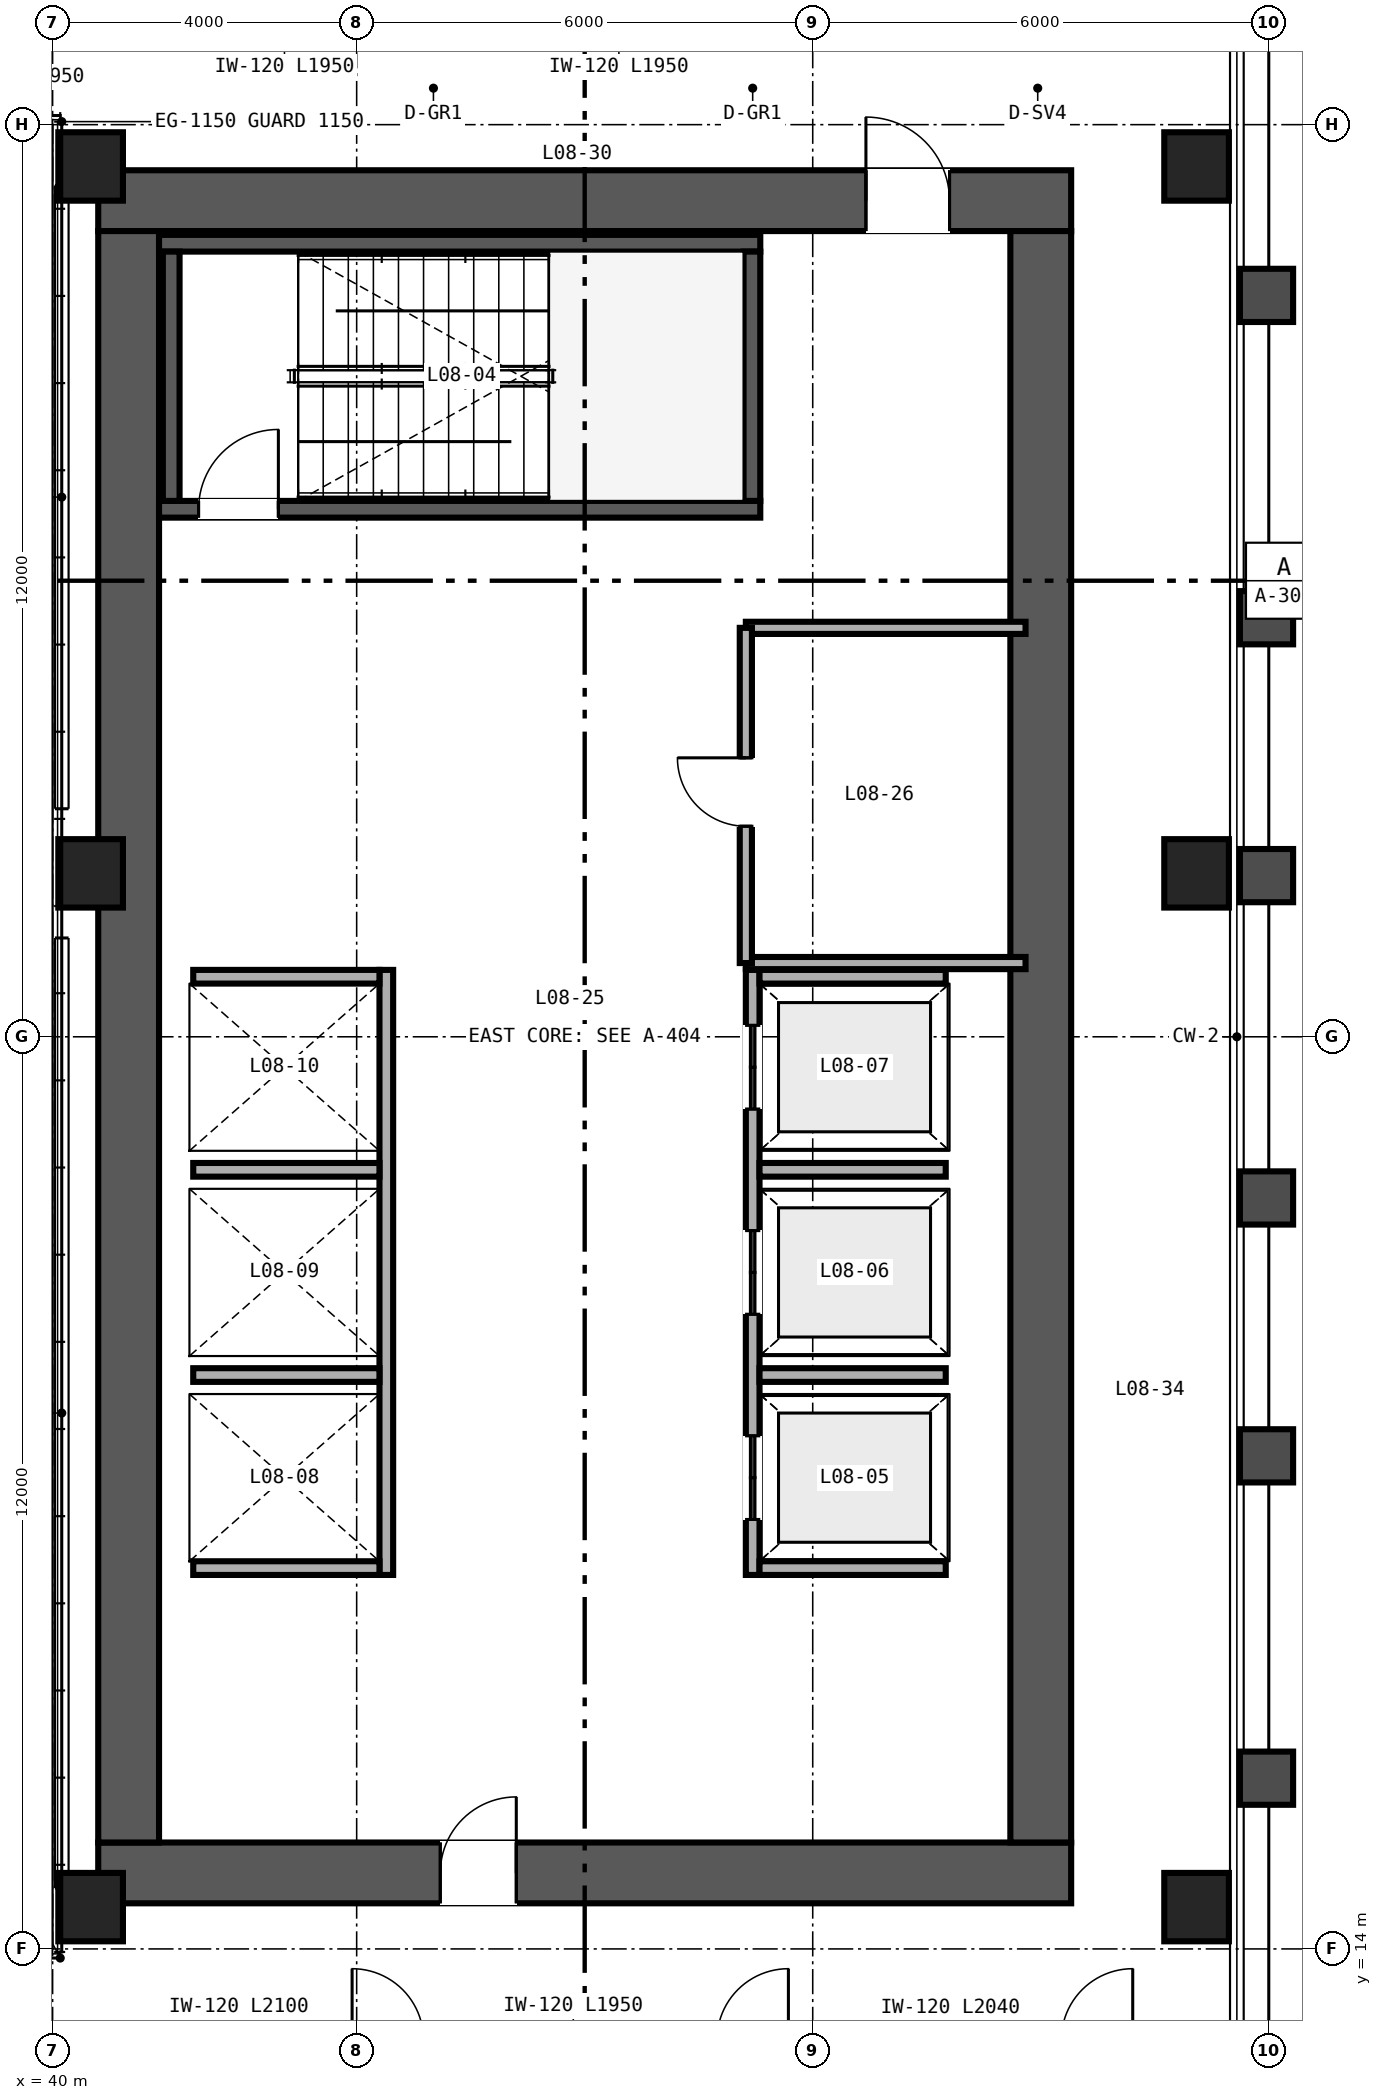
"""IFC4 building model, lengths in metres.
Left out: names, types, materials, properties, quantities, classifications, styles, units other than length and angle.
Written with IfcOpenShell. Run it as: python <this file> out.ifc"""

import sys

from ifc_helpers import new_model, si_unit, direction, frame, frame_2d, origin, origin_2d, place, context, subcontext, project, spatial, rectangle, hollow_rectangle, extrude, source, transform, mapped, element, fill, save


model = new_model("IFC4")
c1 = context("Model", 3, precision=1e-05, world=origin(), true_north=direction((0.0, 1.0)))
c2 = subcontext(c1, "Body", "Model", "MODEL_VIEW")
j1 = project(units=[si_unit("LENGTHUNIT", "METRE"), si_unit("PLANEANGLEUNIT", "RADIAN")], contexts=[c1])
p1 = place(None, origin())
s1 = spatial("IfcSite", under=j1, at=p1, CompositionType="ELEMENT")
p2 = place(p1, origin())
s2 = spatial("IfcBuilding", under=s1, at=p2, CompositionType="ELEMENT")
p3 = place(p2, frame((0.0, 0.0, 38.4)))
s3 = spatial("IfcBuildingStorey", under=s2, at=p3, CompositionType="ELEMENT", Elevation=38.4)
p4 = place(p3, frame((40.6, 15.0, 0.0), z_axis=(0.0, 0.0, 1.0), x_axis=(1.0, 0.0, 0.0)))
e1 = element("IfcWall", 1, at=p4, inside=s3, PredefinedType="SHEAR", context=c2, shape_type="SweptSolid", body=[
    extrude(rectangle(XDim=12.8, YDim=0.8, at=frame_2d((6.4, 0.0))), origin(), (0.0, 0.0, 1.0), 3.35),
])
p5 = place(p4, frame((4.5, 0.0, 0.0)))
e2 = element("IfcOpeningElement", 2, at=p5, cuts=e1, PredefinedType="OPENING", context=c2, shape_type="SweptSolid", body=[
    extrude(rectangle(XDim=1.0, YDim=2.15, at=frame_2d((0.5, 1.075))), frame((0.0, 0.41, 0.0), z_axis=(0.0, -1.0, 0.0), x_axis=(1.0, 0.0, 0.0)), (0.0, 0.0, 1.0), 0.82),
])
p6 = place(p3, frame((40.6, 37.0, 0.0), z_axis=(0.0, 0.0, 1.0), x_axis=(1.0, 0.0, 0.0)))
e3 = element("IfcWall", 3, at=p6, inside=s3, PredefinedType="SHEAR", context=c2, shape_type="SweptSolid", body=[
    extrude(rectangle(XDim=12.8, YDim=0.8, at=frame_2d((6.4, 0.0))), origin(), (0.0, 0.0, 1.0), 3.35),
])
p7 = place(p6, frame((10.1, 0.0, 0.0)))
e4 = element("IfcOpeningElement", 4, at=p7, cuts=e3, PredefinedType="OPENING", context=c2, shape_type="SweptSolid", body=[
    extrude(rectangle(XDim=1.1, YDim=2.15, at=frame_2d((0.55, 1.075))), frame((0.0, 0.41, 0.0), z_axis=(0.0, -1.0, 0.0), x_axis=(1.0, 0.0, 0.0)), (0.0, 0.0, 1.0), 0.82),
])
for number, where, z_axis, x_axis in (
    (5, (41.0, 15.4, 0.0), (0.0, 0.0, 1.0), (0.0, 1.0, 0.0)),
    (6, (53.0, 15.4, 0.0), (0.0, 0.0, 1.0), (0.0, 1.0, 0.0)),
):
    element("IfcWall", number, at=place(p3, frame(where, z_axis=z_axis, x_axis=x_axis)), inside=s3, PredefinedType="SHEAR", context=c2, shape_type="SweptSolid", body=[
        extrude(rectangle(XDim=21.2, YDim=0.8, at=frame_2d((10.6, 0.0))), origin(), (0.0, 0.0, 1.0), 3.35),
    ])
p8 = place(p3, frame((41.4, 32.94, 0.0), z_axis=(0.0, 0.0, 1.0), x_axis=(1.0, 0.0, 0.0)))
e7 = element("IfcWall", 7, at=p8, inside=s3, PredefinedType="SHEAR", context=c2, shape_type="SweptSolid", body=[
    extrude(rectangle(XDim=7.91, YDim=0.22, at=frame_2d((3.955, 0.0))), origin(), (0.0, 0.0, 1.0), 3.4),
])
p9 = place(p8, frame((0.52, 0.0, 0.0)))
e8 = element("IfcOpeningElement", 8, at=p9, cuts=e7, PredefinedType="OPENING", context=c2, shape_type="SweptSolid", body=[
    extrude(rectangle(XDim=1.05, YDim=2.15, at=frame_2d((0.525, 1.075))), frame((0.0, 0.12, 0.0), z_axis=(0.0, -1.0, 0.0), x_axis=(1.0, 0.0, 0.0)), (0.0, 0.0, 1.0), 0.24),
])
p10 = place(p3, frame((41.4, 36.44, 0.0), z_axis=(0.0, 0.0, 1.0), x_axis=(1.0, 0.0, 0.0)))
e9 = element("IfcWall", 9, at=p10, inside=s3, PredefinedType="SHEAR", context=c2, shape_type="SweptSolid", body=[
    extrude(rectangle(XDim=7.91, YDim=0.22, at=frame_2d((3.955, 0.0))), origin(), (0.0, 0.0, 1.0), 3.4),
])
for number, where, z_axis, x_axis in (
    (10, (41.56, 33.05, 0.0), (0.0, 0.0, 1.0), (0.0, 1.0, 0.0)),
    (11, (49.2, 33.05, 0.0), (0.0, 0.0, 1.0), (0.0, 1.0, 0.0)),
):
    element("IfcWall", number, at=place(p3, frame(where, z_axis=z_axis, x_axis=x_axis)), inside=s3, PredefinedType="SHEAR", context=c2, shape_type="SweptSolid", body=[
        extrude(rectangle(XDim=3.28, YDim=0.22, at=frame_2d((1.64, 0.0))), origin(), (0.0, 0.0, 1.0), 3.4),
    ])
m1 = source(origin(), c2, "Body", "SweptSolid", [
    extrude(hollow_rectangle(XDim=0.85, YDim=0.9, WallThickness=0.04, at=origin_2d()), origin(), (0.0, 0.0, 1.0), 3.35),
])
for number, where, z_axis, x_axis in (
    (12, (40.5, 14.55, 0.0), (0.0, 0.0, 1.0), (1.0, 0.0, 0.0)),
    (13, (55.05, 14.55, 0.0), (0.0, 0.0, 1.0), (1.0, 0.0, 0.0)),
    (14, (40.5, 28.15, 0.0), (0.0, 0.0, 1.0), (1.0, 0.0, 0.0)),
    (15, (55.05, 28.15, 0.0), (0.0, 0.0, 1.0), (1.0, 0.0, 0.0)),
    (16, (40.5, 37.45, 0.0), (0.0, 0.0, 1.0), (1.0, 0.0, 0.0)),
    (17, (55.05, 37.45, 0.0), (0.0, 0.0, 1.0), (1.0, 0.0, 0.0)),
):
    element("IfcColumn", number, at=place(p3, frame(where, z_axis=z_axis, x_axis=x_axis)), inside=s3, PredefinedType="COLUMN", context=c2, shape_type="MappedRepresentation", body=[
        mapped(m1, transform((0.0, 0.0, 0.0), scale=1.0)),
    ])
p11 = place(p3, frame((49.21, 18.92, 0.0), z_axis=(0.0, 0.0, 1.0), x_axis=(0.0, 1.0, 0.0)))
e18 = element("IfcWall", 18, at=p11, inside=s3, PredefinedType="SOLIDWALL", context=c2, shape_type="SweptSolid", body=[
    extrude(rectangle(XDim=7.96, YDim=0.18, at=frame_2d((3.98, 0.0))), origin(), (0.0, 0.0, 1.0), 3.35),
])
p12 = place(p11, frame((0.73, 0.0, 0.0)))
e19 = element("IfcOpeningElement", 19, at=p12, cuts=e18, PredefinedType="OPENING", context=c2, shape_type="SweptSolid", body=[
    extrude(rectangle(XDim=1.1, YDim=2.2, at=frame_2d((0.55, 1.1))), frame((0.0, 0.1, 0.0), z_axis=(0.0, -1.0, 0.0), x_axis=(1.0, 0.0, 0.0)), (0.0, 0.0, 1.0), 0.2),
])
p13 = place(p11, frame((3.43, 0.0, 0.0)))
e20 = element("IfcOpeningElement", 20, at=p13, cuts=e18, PredefinedType="OPENING", context=c2, shape_type="SweptSolid", body=[
    extrude(rectangle(XDim=1.1, YDim=2.2, at=frame_2d((0.55, 1.1))), frame((0.0, 0.1, 0.0), z_axis=(0.0, -1.0, 0.0), x_axis=(1.0, 0.0, 0.0)), (0.0, 0.0, 1.0), 0.2),
])
p14 = place(p11, frame((6.13, 0.0, 0.0)))
e21 = element("IfcOpeningElement", 21, at=p14, cuts=e18, PredefinedType="OPENING", context=c2, shape_type="SweptSolid", body=[
    extrude(rectangle(XDim=1.1, YDim=2.2, at=frame_2d((0.55, 1.1))), frame((0.0, 0.1, 0.0), z_axis=(0.0, -1.0, 0.0), x_axis=(1.0, 0.0, 0.0)), (0.0, 0.0, 1.0), 0.2),
])
for number, where, z_axis, x_axis in (
    (22, (49.3, 19.01, 0.0), (0.0, 0.0, 1.0), (1.0, 0.0, 0.0)),
    (23, (49.3, 26.79, 0.0), (0.0, 0.0, 1.0), (1.0, 0.0, 0.0)),
    (24, (49.3, 21.55, 0.0), (0.0, 0.0, 1.0), (1.0, 0.0, 0.0)),
    (25, (49.3, 24.25, 0.0), (0.0, 0.0, 1.0), (1.0, 0.0, 0.0)),
):
    element("IfcWall", number, at=place(p3, frame(where, z_axis=z_axis, x_axis=x_axis)), inside=s3, PredefinedType="SOLIDWALL", context=c2, shape_type="SweptSolid", body=[
        extrude(rectangle(XDim=2.45, YDim=0.18, at=frame_2d((1.225, 0.0))), origin(), (0.0, 0.0, 1.0), 3.35),
    ])
p15 = place(p3, frame((44.39, 18.92, 0.0), z_axis=(0.0, 0.0, 1.0), x_axis=(0.0, 1.0, 0.0)))
e26 = element("IfcWall", 26, at=p15, inside=s3, PredefinedType="SOLIDWALL", context=c2, shape_type="SweptSolid", body=[
    extrude(rectangle(XDim=7.96, YDim=0.18, at=frame_2d((3.98, 0.0))), origin(), (0.0, 0.0, 1.0), 3.35),
])
for number, where, z_axis, x_axis in (
    (27, (41.85, 19.01, 0.0), (0.0, 0.0, 1.0), (1.0, 0.0, 0.0)),
    (28, (41.85, 26.79, 0.0), (0.0, 0.0, 1.0), (1.0, 0.0, 0.0)),
    (29, (41.85, 21.55, 0.0), (0.0, 0.0, 1.0), (1.0, 0.0, 0.0)),
    (30, (41.85, 24.25, 0.0), (0.0, 0.0, 1.0), (1.0, 0.0, 0.0)),
):
    element("IfcWall", number, at=place(p3, frame(where, z_axis=z_axis, x_axis=x_axis)), inside=s3, PredefinedType="SOLIDWALL", context=c2, shape_type="SweptSolid", body=[
        extrude(rectangle(XDim=2.45, YDim=0.18, at=frame_2d((1.225, 0.0))), origin(), (0.0, 0.0, 1.0), 3.35),
    ])
p16 = place(p3, frame((49.12, 26.97, 0.0), z_axis=(0.0, 0.0, 1.0), x_axis=(1.0, 0.0, 0.0)))
e31 = element("IfcWall", 31, at=p16, inside=s3, PredefinedType="PARTITIONING", context=c2, shape_type="SweptSolid", body=[
    extrude(rectangle(XDim=3.68, YDim=0.16, at=frame_2d((1.84, 0.0))), origin(), (0.0, 0.0, 1.0), 3.35),
])
p17 = place(p3, frame((49.12, 31.38, 0.0), z_axis=(0.0, 0.0, 1.0), x_axis=(1.0, 0.0, 0.0)))
e32 = element("IfcWall", 32, at=p17, inside=s3, PredefinedType="PARTITIONING", context=c2, shape_type="SweptSolid", body=[
    extrude(rectangle(XDim=3.68, YDim=0.16, at=frame_2d((1.84, 0.0))), origin(), (0.0, 0.0, 1.0), 2.36),
])
p18 = place(p3, frame((49.12, 26.97, 0.0), z_axis=(0.0, 0.0, 1.0), x_axis=(0.0, 1.0, 0.0)))
e33 = element("IfcWall", 33, at=p18, inside=s3, PredefinedType="PARTITIONING", context=c2, shape_type="SweptSolid", body=[
    extrude(rectangle(XDim=4.41, YDim=0.16, at=frame_2d((2.205, 0.0))), origin(), (0.0, 0.0, 1.0), 2.36),
])
p19 = place(p18, frame((1.8, 0.0, 0.0)))
e34 = element("IfcOpeningElement", 34, at=p19, cuts=e33, PredefinedType="OPENING", context=c2, shape_type="SweptSolid", body=[
    extrude(rectangle(XDim=0.9, YDim=2.15, at=frame_2d((0.45, 1.075))), frame((0.0, 0.09, 0.0), z_axis=(0.0, -1.0, 0.0), x_axis=(1.0, 0.0, 0.0)), (0.0, 0.0, 1.0), 0.18),
])
m2 = source(origin(), c2, "Body", "SweptSolid", [
    extrude(rectangle(XDim=1.05, YDim=2.15, at=frame_2d((0.525, 1.075))), frame((0.0, 0.025, 0.0), z_axis=(0.0, -1.0, 0.0), x_axis=(1.0, 0.0, 0.0)), (0.0, 0.0, 1.0), 0.05),
])
p20 = place(p9, origin())
e35 = element("IfcDoor", 35, at=p20, inside=s3, OperationType="SINGLE_SWING_RIGHT", PredefinedType="DOOR", context=c2, shape_type="MappedRepresentation", body=[
    mapped(m2, transform((0.0, 0.0, 0.0), scale=1.0)),
])
fill(e8, e35)
m3 = source(origin(), c2, "Body", "SweptSolid", [
    extrude(rectangle(XDim=1.1, YDim=2.2, at=frame_2d((0.55, 1.1))), frame((0.0, 0.025, 0.0), z_axis=(0.0, -1.0, 0.0), x_axis=(1.0, 0.0, 0.0)), (0.0, 0.0, 1.0), 0.05),
])
p21 = place(p12, origin())
e36 = element("IfcDoor", 36, at=p21, inside=s3, OperationType="DOUBLE_DOOR_SLIDING", PredefinedType="DOOR", context=c2, shape_type="MappedRepresentation", body=[
    mapped(m3, transform((0.0, 0.0, 0.0), scale=1.0)),
])
fill(e19, e36)
p22 = place(p13, origin())
e37 = element("IfcDoor", 37, at=p22, inside=s3, OperationType="DOUBLE_DOOR_SLIDING", PredefinedType="DOOR", context=c2, shape_type="MappedRepresentation", body=[
    mapped(m3, transform((0.0, 0.0, 0.0), scale=1.0)),
])
fill(e20, e37)
p23 = place(p14, origin())
e38 = element("IfcDoor", 38, at=p23, inside=s3, OperationType="DOUBLE_DOOR_SLIDING", PredefinedType="DOOR", context=c2, shape_type="MappedRepresentation", body=[
    mapped(m3, transform((0.0, 0.0, 0.0), scale=1.0)),
])
fill(e21, e38)
m4 = source(origin(), c2, "Body", "SweptSolid", [
    extrude(rectangle(XDim=1.0, YDim=2.15, at=frame_2d((0.5, 1.075))), frame((0.0, 0.025, 0.0), z_axis=(0.0, -1.0, 0.0), x_axis=(1.0, 0.0, 0.0)), (0.0, 0.0, 1.0), 0.05),
])
p24 = place(p5, origin())
e39 = element("IfcDoor", 39, at=p24, inside=s3, OperationType="SINGLE_SWING_RIGHT", PredefinedType="DOOR", context=c2, shape_type="MappedRepresentation", body=[
    mapped(m4, transform((0.0, 0.0, 0.0), scale=1.0)),
])
fill(e2, e39)
m5 = source(origin(), c2, "Body", "SweptSolid", [
    extrude(rectangle(XDim=1.1, YDim=2.15, at=frame_2d((0.55, 1.075))), frame((0.0, 0.025, 0.0), z_axis=(0.0, -1.0, 0.0), x_axis=(1.0, 0.0, 0.0)), (0.0, 0.0, 1.0), 0.05),
])
p25 = place(p7, origin())
e40 = element("IfcDoor", 40, at=p25, inside=s3, OperationType="SINGLE_SWING_LEFT", PredefinedType="DOOR", context=c2, shape_type="MappedRepresentation", body=[
    mapped(m5, transform((0.0, 0.0, 0.0), scale=1.0)),
])
fill(e4, e40)
m6 = source(origin(), c2, "Body", "SweptSolid", [
    extrude(rectangle(XDim=0.9, YDim=2.15, at=frame_2d((0.45, 1.075))), frame((0.0, 0.025, 0.0), z_axis=(0.0, -1.0, 0.0), x_axis=(1.0, 0.0, 0.0)), (0.0, 0.0, 1.0), 0.05),
])
p26 = place(p19, origin())
e41 = element("IfcDoor", 41, at=p26, inside=s3, OperationType="SINGLE_SWING_RIGHT", PredefinedType="DOOR", context=c2, shape_type="MappedRepresentation", body=[
    mapped(m6, transform((0.0, 0.0, 0.0), scale=1.0)),
])
fill(e34, e41)
save(model, sys.argv[1])
